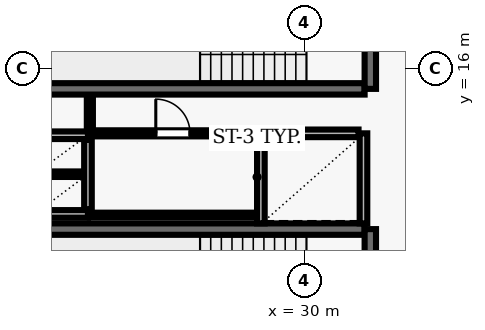
"""IFC4 building model, lengths in metres.
Left out: names, types, materials, properties, quantities, classifications, styles, units other than length and angle.
Written with IfcOpenShell. Run it as: python <this file> out.ifc"""

import sys

from ifc_helpers import new_model, si_unit, direction, frame, frame_2d, origin, place, context, subcontext, project, spatial, rectangle, extrude, element, fill, save


model = new_model("IFC4")
c1 = context("Model", 3, precision=1e-05, world=origin(), true_north=direction((0.0, 1.0)))
c2 = subcontext(c1, "Body", "Model", "MODEL_VIEW")
j1 = project(units=[si_unit("LENGTHUNIT", "METRE"), si_unit("PLANEANGLEUNIT", "RADIAN")], contexts=[c1])
p1 = place(None, origin())
s1 = spatial("IfcSite", under=j1, at=p1, CompositionType="ELEMENT")
p2 = place(p1, origin())
s2 = spatial("IfcBuilding", under=s1, at=p2, CompositionType="ELEMENT")
p3 = place(p2, frame((0.0, 0.0, 81.7)))
s3 = spatial("IfcBuildingStorey", under=s2, at=p3, CompositionType="ELEMENT", Elevation=81.7)
p4 = place(p3, frame((23.22, 15.47, 0.0), z_axis=(0.0, 0.0, 1.0), x_axis=(1.0, 0.0, 0.0)))
e1 = element("IfcWall", 1, at=p4, inside=s3, PredefinedType="SHEAR", context=c2, shape_type="SweptSolid", body=[
    extrude(rectangle(XDim=8.36, YDim=0.3, at=frame_2d((4.18, 0.0))), origin(), (0.0, 0.0, 1.0), 3.69),
])
p5 = place(p3, frame((31.73, 15.47, 0.0), z_axis=(0.0, 0.0, 1.0), x_axis=(0.0, 1.0, 0.0)))
e2 = element("IfcWall", 2, at=p5, inside=s3, PredefinedType="SHEAR", context=c2, shape_type="SweptSolid", body=[
    extrude(rectangle(XDim=3.51, YDim=0.3, at=frame_2d((1.755, 0.0))), origin(), (0.0, 0.0, 1.0), 3.69),
])
p6 = place(p5, frame((1.18, 0.0, 0.0)))
e3 = element("IfcOpeningElement", 3, at=p6, cuts=e2, PredefinedType="OPENING", context=c2, shape_type="SweptSolid", body=[
    extrude(rectangle(XDim=1.15, YDim=2.15, at=frame_2d((0.575, 1.075))), frame((0.0, 0.16, 0.0), z_axis=(0.0, -1.0, 0.0), x_axis=(1.0, 0.0, 0.0)), (0.0, 0.0, 1.0), 0.32),
])
p7 = place(p3, frame((31.58, 11.78, 0.0), z_axis=(0.0, 0.0, 1.0), x_axis=(-1.0, 0.0, 0.0)))
e4 = element("IfcWall", 4, at=p7, inside=s3, PredefinedType="SHEAR", context=c2, shape_type="SweptSolid", body=[
    extrude(rectangle(XDim=8.36, YDim=0.3, at=frame_2d((4.18, 0.0))), origin(), (0.0, 0.0, 1.0), 3.69),
])
p8 = place(p3, frame((31.73, 8.27, 0.0), z_axis=(0.0, 0.0, 1.0), x_axis=(0.0, 1.0, 0.0)))
e5 = element("IfcWall", 5, at=p8, inside=s3, PredefinedType="SHEAR", context=c2, shape_type="SweptSolid", body=[
    extrude(rectangle(XDim=3.51, YDim=0.3, at=frame_2d((1.755, 0.0))), origin(), (0.0, 0.0, 1.0), 3.69),
])
p9 = place(p8, frame((1.18, 0.0, 0.0)))
e6 = element("IfcOpeningElement", 6, at=p9, cuts=e5, PredefinedType="OPENING", context=c2, shape_type="SweptSolid", body=[
    extrude(rectangle(XDim=1.15, YDim=2.15, at=frame_2d((0.575, 1.075))), frame((0.0, 0.16, 0.0), z_axis=(0.0, -1.0, 0.0), x_axis=(1.0, 0.0, 0.0)), (0.0, 0.0, 1.0), 0.32),
])
for number, where, z_axis, x_axis in (
    (7, (28.85, 14.3, 0.0), (0.0, 0.0, 1.0), (0.0, -1.0, 0.0)),
    (8, (31.55, 11.93, 0.0), (0.0, 0.0, 1.0), (0.0, 1.0, 0.0)),
):
    element("IfcWall", number, at=place(p3, frame(where, z_axis=z_axis, x_axis=x_axis)), inside=s3, PredefinedType="SOLIDWALL", context=c2, shape_type="SweptSolid", body=[
        extrude(rectangle(XDim=2.37, YDim=0.2, at=frame_2d((1.185, 0.0))), origin(), (0.0, 0.0, 1.0), 3.69),
    ])
p10 = place(p3, frame((31.42, 14.3, 0.0), z_axis=(0.0, 0.0, 1.0), x_axis=(-1.0, 0.0, 0.0)))
e9 = element("IfcWall", 9, at=p10, inside=s3, PredefinedType="SOLIDWALL", context=c2, shape_type="SweptSolid", body=[
    extrude(rectangle(XDim=2.44, YDim=0.2, at=frame_2d((1.22, 0.0))), origin(), (0.0, 0.0, 1.0), 3.69),
])
for number, where, z_axis, x_axis in (
    (10, (22.9, 14.25, 0.0), (0.0, 0.0, 1.0), (1.0, 0.0, 0.0)),
    (11, (22.9, 12.18, 0.0), (0.0, 0.0, 1.0), (1.0, 0.0, 0.0)),
):
    element("IfcWall", number, at=place(p3, frame(where, z_axis=z_axis, x_axis=x_axis)), inside=s3, PredefinedType="SOLIDWALL", context=c2, shape_type="SweptSolid", body=[
        extrude(rectangle(XDim=1.4, YDim=0.2, at=frame_2d((0.7, 0.0))), origin(), (0.0, 0.0, 1.0), 3.69),
    ])
p11 = place(p3, frame((24.3, 12.3, 0.0), z_axis=(0.0, 0.0, 1.0), x_axis=(0.0, 1.0, 0.0)))
e12 = element("IfcWall", 12, at=p11, inside=s3, PredefinedType="SOLIDWALL", context=c2, shape_type="SweptSolid", body=[
    extrude(rectangle(XDim=1.83, YDim=0.2, at=frame_2d((0.915, 0.0))), origin(), (0.0, 0.0, 1.0), 3.69),
])
p12 = place(p3, frame((23.01, 13.225, 0.0), z_axis=(0.0, 0.0, 1.0), x_axis=(1.0, 0.0, 0.0)))
e13 = element("IfcWall", 13, at=p12, inside=s3, PredefinedType="PARTITIONING", context=c2, shape_type="SweptSolid", body=[
    extrude(rectangle(XDim=1.18, YDim=0.145, at=frame_2d((0.59, 0.0))), origin(), (0.0, 0.0, 1.0), 3.69),
])
p13 = place(p3, frame((24.35, 12.15, 0.0), z_axis=(0.0, 0.0, 1.0), x_axis=(1.0, 0.0, 0.0)))
e14 = element("IfcWall", 14, at=p13, inside=s3, PredefinedType="PARTITIONING", context=c2, shape_type="SweptSolid", body=[
    extrude(rectangle(XDim=4.37, YDim=0.125, at=frame_2d((2.185, 0.0))), origin(), (0.0, 0.0, 1.0), 3.69),
])
p14 = place(p3, frame((24.35, 14.3, 0.0), z_axis=(0.0, 0.0, 1.0), x_axis=(1.0, 0.0, 0.0)))
e15 = element("IfcWall", 15, at=p14, inside=s3, PredefinedType="PARTITIONING", context=c2, shape_type="SweptSolid", body=[
    extrude(rectangle(XDim=4.37, YDim=0.16, at=frame_2d((2.185, 0.0))), origin(), (0.0, 0.0, 1.0), 3.69),
])
p15 = place(p14, frame((1.735, 0.0, 0.0)))
e16 = element("IfcOpeningElement", 16, at=p15, cuts=e15, PredefinedType="OPENING", context=c2, shape_type="SweptSolid", body=[
    extrude(rectangle(XDim=0.9, YDim=2.1, at=frame_2d((0.45, 1.05))), frame((0.0, 0.09, 0.0), z_axis=(0.0, -1.0, 0.0), x_axis=(1.0, 0.0, 0.0)), (0.0, 0.0, 1.0), 0.18),
])
p16 = place(p3, frame((24.35, 15.29, 0.0), z_axis=(0.0, 0.0, 1.0), x_axis=(0.0, -1.0, 0.0)))
e17 = element("IfcWall", 17, at=p16, inside=s3, PredefinedType="PARTITIONING", context=c2, shape_type="SweptSolid", body=[
    extrude(rectangle(XDim=0.915, YDim=0.16, at=frame_2d((0.458, 0.0))), origin(), (0.0, 0.0, 1.0), 3.69),
])
p17 = place(p15, origin())
e18 = element("IfcDoor", 18, at=p17, inside=s3, OperationType="SINGLE_SWING_LEFT", PredefinedType="DOOR", context=c2, shape_type="SweptSolid", body=[
    extrude(rectangle(XDim=0.9, YDim=2.1, at=frame_2d((0.45, 1.05))), frame((0.0, 0.025, 0.0), z_axis=(0.0, -1.0, 0.0), x_axis=(1.0, 0.0, 0.0)), (0.0, 0.0, 1.0), 0.05),
])
fill(e16, e18)
save(model, sys.argv[1])
